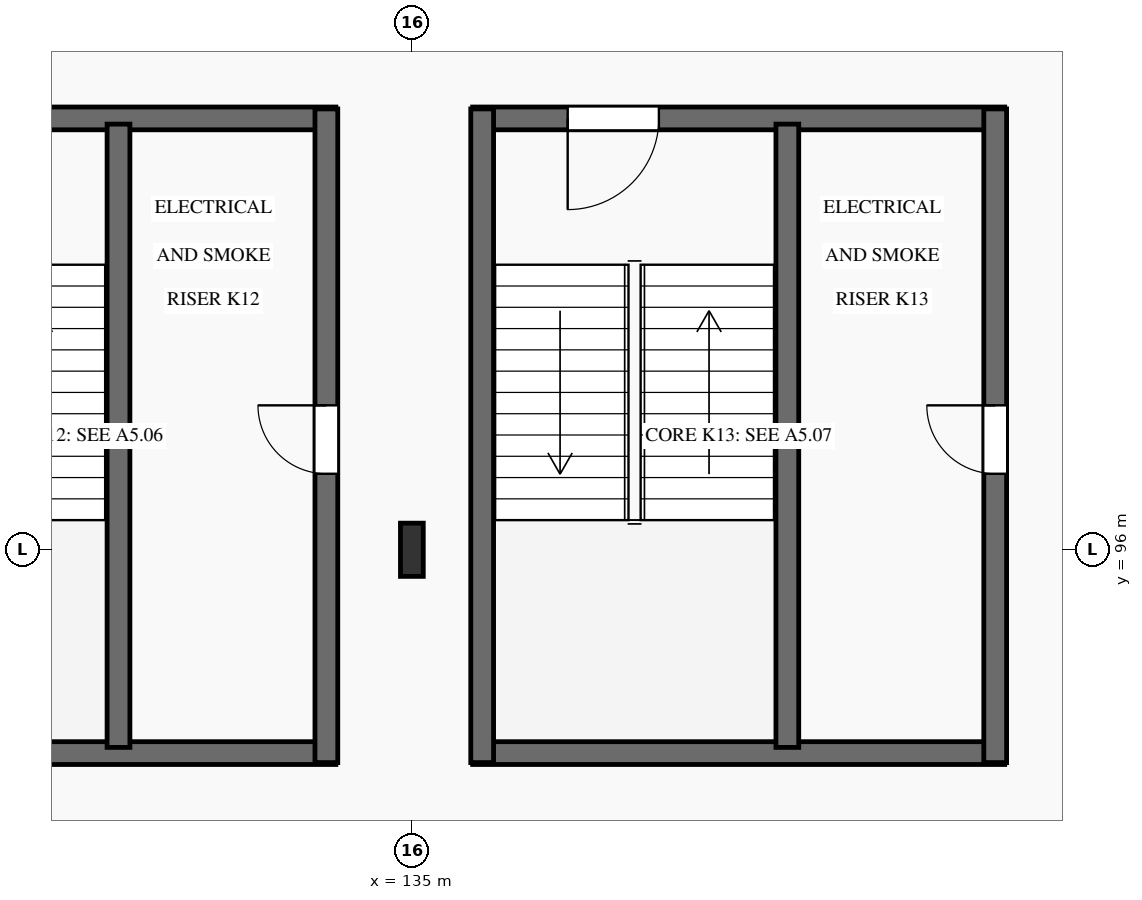
"""IFC4 building model, lengths in metres.
Left out: names, types, materials, properties, quantities, classifications, styles, units other than length and angle.
Written with IfcOpenShell. Run it as: python <this file> out.ifc"""

import sys

from ifc_helpers import new_model, si_unit, direction, frame, frame_2d, origin, origin_2d, place, context, subcontext, project, spatial, rectangle, i_section, extrude, element, fill, save


model = new_model("IFC4")
c1 = context("Model", 3, precision=1e-05, world=origin(), true_north=direction((0.0, 1.0)))
c2 = subcontext(c1, "Body", "Model", "MODEL_VIEW")
j1 = project(units=[si_unit("LENGTHUNIT", "METRE"), si_unit("PLANEANGLEUNIT", "RADIAN")], contexts=[c1])
p1 = place(None, origin())
s1 = spatial("IfcSite", under=j1, at=p1, CompositionType="ELEMENT")
p2 = place(p1, origin())
s2 = spatial("IfcBuilding", under=s1, at=p2, CompositionType="ELEMENT")
p3 = place(p2, frame((0.0, 0.0, -4.5)))
s3 = spatial("IfcBuildingStorey", under=s2, at=p3, CompositionType="ELEMENT", Elevation=-4.5)
p4 = place(p3, frame((135.0, 96.0, 0.0), z_axis=(0.0, 0.0, 1.0), x_axis=(1.0, 0.0, 0.0)))
e1 = element("IfcColumn", 1, at=p4, inside=s3, PredefinedType="COLUMN", context=c2, shape_type="SweptSolid", body=[
    extrude(i_section(OverallWidth=0.3, OverallDepth=0.7, WebThickness=0.017, FlangeThickness=0.032, FilletRadius=0.027, at=origin_2d()), origin(), (0.0, 0.0, 1.0), 4.5),
])
p5 = place(p3, frame((127.0, 93.325, 0.0), z_axis=(0.0, 0.0, 1.0), x_axis=(1.0, 0.0, 0.0)))
e2 = element("IfcWall", 2, at=p5, inside=s3, PredefinedType="SHEAR", context=c2, shape_type="SweptSolid", body=[
    extrude(rectangle(XDim=7.0, YDim=0.3, at=frame_2d((3.5, 0.0))), origin(), (0.0, 0.0, 1.0), 4.5),
])
p6 = place(p3, frame((127.0, 101.675, 0.0), z_axis=(0.0, 0.0, 1.0), x_axis=(1.0, 0.0, 0.0)))
e3 = element("IfcWall", 3, at=p6, inside=s3, PredefinedType="SHEAR", context=c2, shape_type="SweptSolid", body=[
    extrude(rectangle(XDim=7.0, YDim=0.3, at=frame_2d((3.5, 0.0))), origin(), (0.0, 0.0, 1.0), 4.5),
])
p7 = place(p6, frame((1.25, 0.0, 0.0)))
e4 = element("IfcOpeningElement", 4, at=p7, cuts=e3, PredefinedType="OPENING", context=c2, shape_type="SweptSolid", body=[
    extrude(rectangle(XDim=1.2, YDim=2.15, at=frame_2d((0.6, 1.075))), frame((0.0, 0.165, 0.0), z_axis=(0.0, -1.0, 0.0), x_axis=(1.0, 0.0, 0.0)), (0.0, 0.0, 1.0), 0.33),
])
p8 = place(p3, frame((133.875, 93.2, 0.0), z_axis=(0.0, 0.0, 1.0), x_axis=(0.0, 1.0, 0.0)))
e5 = element("IfcWall", 5, at=p8, inside=s3, PredefinedType="SHEAR", context=c2, shape_type="SweptSolid", body=[
    extrude(rectangle(XDim=8.6, YDim=0.3, at=frame_2d((4.3, 0.0))), origin(), (0.0, 0.0, 1.0), 4.5),
])
p9 = place(p8, frame((3.8, 0.0, 0.0)))
e6 = element("IfcOpeningElement", 6, at=p9, cuts=e5, PredefinedType="OPENING", context=c2, shape_type="SweptSolid", body=[
    extrude(rectangle(XDim=0.9, YDim=2.05, at=frame_2d((0.45, 1.025))), frame((0.0, 0.165, 0.0), z_axis=(0.0, -1.0, 0.0), x_axis=(1.0, 0.0, 0.0)), (0.0, 0.0, 1.0), 0.33),
])
p10 = place(p3, frame((131.14, 93.4, 0.0), z_axis=(0.0, 0.0, 1.0), x_axis=(0.0, 1.0, 0.0)))
e7 = element("IfcWall", 7, at=p10, inside=s3, PredefinedType="SHEAR", context=c2, shape_type="SweptSolid", body=[
    extrude(rectangle(XDim=8.2, YDim=0.3, at=frame_2d((4.1, 0.0))), origin(), (0.0, 0.0, 1.0), 4.5),
])
p11 = place(p3, frame((135.8, 93.325, 0.0), z_axis=(0.0, 0.0, 1.0), x_axis=(1.0, 0.0, 0.0)))
e8 = element("IfcWall", 8, at=p11, inside=s3, PredefinedType="SHEAR", context=c2, shape_type="SweptSolid", body=[
    extrude(rectangle(XDim=7.0, YDim=0.3, at=frame_2d((3.5, 0.0))), origin(), (0.0, 0.0, 1.0), 4.5),
])
p12 = place(p3, frame((135.8, 101.675, 0.0), z_axis=(0.0, 0.0, 1.0), x_axis=(1.0, 0.0, 0.0)))
e9 = element("IfcWall", 9, at=p12, inside=s3, PredefinedType="SHEAR", context=c2, shape_type="SweptSolid", body=[
    extrude(rectangle(XDim=7.0, YDim=0.3, at=frame_2d((3.5, 0.0))), origin(), (0.0, 0.0, 1.0), 4.5),
])
p13 = place(p12, frame((1.25, 0.0, 0.0)))
e10 = element("IfcOpeningElement", 10, at=p13, cuts=e9, PredefinedType="OPENING", context=c2, shape_type="SweptSolid", body=[
    extrude(rectangle(XDim=1.2, YDim=2.15, at=frame_2d((0.6, 1.075))), frame((0.0, 0.165, 0.0), z_axis=(0.0, -1.0, 0.0), x_axis=(1.0, 0.0, 0.0)), (0.0, 0.0, 1.0), 0.33),
])
p14 = place(p3, frame((135.925, 93.2, 0.0), z_axis=(0.0, 0.0, 1.0), x_axis=(0.0, 1.0, 0.0)))
e11 = element("IfcWall", 11, at=p14, inside=s3, PredefinedType="SHEAR", context=c2, shape_type="SweptSolid", body=[
    extrude(rectangle(XDim=8.6, YDim=0.3, at=frame_2d((4.3, 0.0))), origin(), (0.0, 0.0, 1.0), 4.5),
])
p15 = place(p3, frame((142.675, 93.2, 0.0), z_axis=(0.0, 0.0, 1.0), x_axis=(0.0, 1.0, 0.0)))
e12 = element("IfcWall", 12, at=p15, inside=s3, PredefinedType="SHEAR", context=c2, shape_type="SweptSolid", body=[
    extrude(rectangle(XDim=8.6, YDim=0.3, at=frame_2d((4.3, 0.0))), origin(), (0.0, 0.0, 1.0), 4.5),
])
p16 = place(p15, frame((3.8, 0.0, 0.0)))
e13 = element("IfcOpeningElement", 13, at=p16, cuts=e12, PredefinedType="OPENING", context=c2, shape_type="SweptSolid", body=[
    extrude(rectangle(XDim=0.9, YDim=2.05, at=frame_2d((0.45, 1.025))), frame((0.0, 0.165, 0.0), z_axis=(0.0, -1.0, 0.0), x_axis=(1.0, 0.0, 0.0)), (0.0, 0.0, 1.0), 0.33),
])
p17 = place(p3, frame((139.94, 93.4, 0.0), z_axis=(0.0, 0.0, 1.0), x_axis=(0.0, 1.0, 0.0)))
e14 = element("IfcWall", 14, at=p17, inside=s3, PredefinedType="SHEAR", context=c2, shape_type="SweptSolid", body=[
    extrude(rectangle(XDim=8.2, YDim=0.3, at=frame_2d((4.1, 0.0))), origin(), (0.0, 0.0, 1.0), 4.5),
])
p18 = place(p9, origin())
e15 = element("IfcDoor", 15, at=p18, inside=s3, OperationType="SINGLE_SWING_RIGHT", PredefinedType="DOOR", context=c2, shape_type="SweptSolid", body=[
    extrude(rectangle(XDim=0.9, YDim=2.05, at=frame_2d((0.45, 1.025))), frame((0.0, 0.025, 0.0), z_axis=(0.0, -1.0, 0.0), x_axis=(1.0, 0.0, 0.0)), (0.0, 0.0, 1.0), 0.05),
])
fill(e6, e15)
p19 = place(p13, frame((1.2, 0.0, 0.0), z_axis=(0.0, 0.0, 1.0), x_axis=(-1.0, 0.0, 0.0)))
e16 = element("IfcDoor", 16, at=p19, inside=s3, OperationType="SINGLE_SWING_LEFT", PredefinedType="DOOR", context=c2, shape_type="SweptSolid", body=[
    extrude(rectangle(XDim=1.2, YDim=2.15, at=frame_2d((0.6, 1.075))), frame((0.0, 0.025, 0.0), z_axis=(0.0, -1.0, 0.0), x_axis=(1.0, 0.0, 0.0)), (0.0, 0.0, 1.0), 0.05),
])
fill(e10, e16)
p20 = place(p16, origin())
e17 = element("IfcDoor", 17, at=p20, inside=s3, OperationType="SINGLE_SWING_RIGHT", PredefinedType="DOOR", context=c2, shape_type="SweptSolid", body=[
    extrude(rectangle(XDim=0.9, YDim=2.05, at=frame_2d((0.45, 1.025))), frame((0.0, 0.025, 0.0), z_axis=(0.0, -1.0, 0.0), x_axis=(1.0, 0.0, 0.0)), (0.0, 0.0, 1.0), 0.05),
])
fill(e13, e17)
save(model, sys.argv[1])
